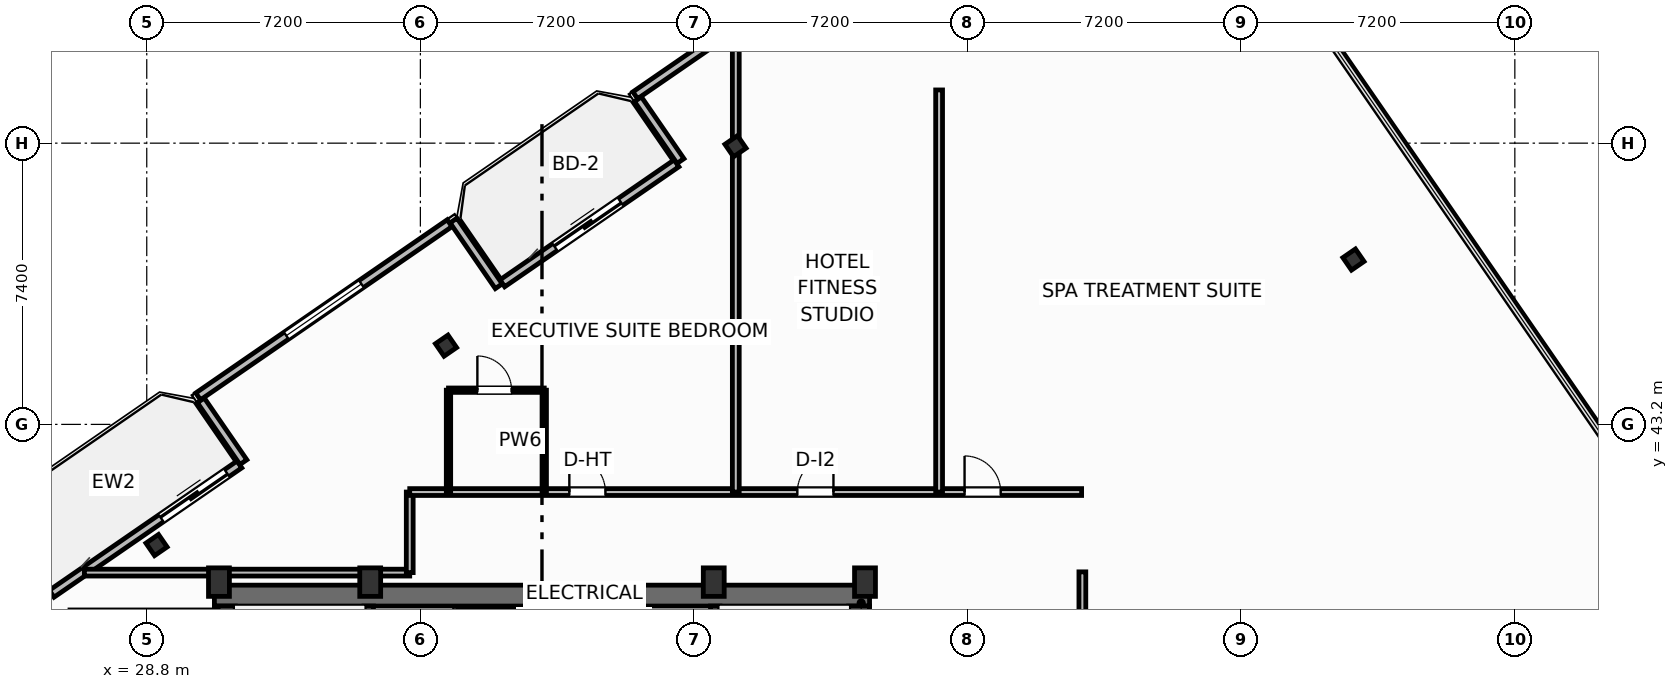
"""IFC4 building model, lengths in metres.
Left out: names, types, materials, properties, quantities, classifications, styles, units other than length and angle.
Written with IfcOpenShell. Run it as: python <this file> out.ifc"""

import sys

from ifc_helpers import new_model, si_unit, direction, frame, frame_2d, origin, origin_2d, place, context, subcontext, project, spatial, rectangle, i_section, extrude, element, fill, save


model = new_model("IFC4")
c1 = context("Model", 3, precision=1e-05, world=origin(), true_north=direction((0.0, 1.0)))
c2 = subcontext(c1, "Body", "Model", "MODEL_VIEW")
j1 = project(units=[si_unit("LENGTHUNIT", "METRE"), si_unit("PLANEANGLEUNIT", "RADIAN")], contexts=[c1])
p1 = place(None, origin())
s1 = spatial("IfcSite", under=j1, at=p1, CompositionType="ELEMENT")
p2 = place(p1, origin())
s2 = spatial("IfcBuilding", under=s1, at=p2, CompositionType="ELEMENT")
p3 = place(p2, frame((0.0, 0.0, 287.8)))
s3 = spatial("IfcBuildingStorey", under=s2, at=p3, CompositionType="ELEMENT", Elevation=287.8)
for number, where, z_axis, x_axis in (
    (1, (30.7, 39.05, 0.0), (0.0, 0.0, 1.0), (1.0, 0.0, 0.0)),
    (2, (34.68, 39.05, 0.0), (0.0, 0.0, 1.0), (1.0, 0.0, 0.0)),
    (3, (43.72, 39.05, 0.0), (0.0, 0.0, 1.0), (1.0, 0.0, 0.0)),
    (4, (47.7, 39.05, 0.0), (0.0, 0.0, 1.0), (1.0, 0.0, 0.0)),
):
    element("IfcColumn", number, at=place(p3, frame(where, z_axis=z_axis, x_axis=x_axis)), inside=s3, PredefinedType="COLUMN", context=c2, shape_type="SweptSolid", body=[
        extrude(rectangle(XDim=0.55, YDim=0.75, at=origin_2d()), origin(), (0.0, 0.0, 1.0), 3.7),
    ])
p4 = place(p3, frame((30.58, 38.695, 0.0), z_axis=(0.0, 0.0, 1.0), x_axis=(1.0, 0.0, 0.0)))
e5 = element("IfcWall", 5, at=p4, inside=s3, PredefinedType="SHEAR", context=c2, shape_type="SweptSolid", body=[
    extrude(rectangle(XDim=17.24, YDim=0.55, at=frame_2d((8.62, 0.0))), origin(), (0.0, 0.0, 1.0), 3.38),
])
for number, where, z_axis, x_axis in (
    (6, (30.855, 29.2, 0.0), (0.0, 0.0, 1.0), (0.0, 1.0, 0.0)),
    (7, (47.545, 29.2, 0.0), (0.0, 0.0, 1.0), (0.0, 1.0, 0.0)),
):
    element("IfcWall", number, at=place(p3, frame(where, z_axis=z_axis, x_axis=x_axis)), inside=s3, PredefinedType="SHEAR", context=c2, shape_type="SweptSolid", body=[
        extrude(rectangle(XDim=9.22, YDim=0.55, at=frame_2d((4.61, 0.0))), origin(), (0.0, 0.0, 1.0), 3.38),
    ])
p5 = place(p3, frame((34.64, 29.2, 0.0), z_axis=(0.0, 0.0, 1.0), x_axis=(0.0, 1.0, 0.0)))
e8 = element("IfcWall", 8, at=p5, inside=s3, PredefinedType="SHEAR", context=c2, shape_type="SweptSolid", body=[
    extrude(rectangle(XDim=9.22, YDim=0.25, at=frame_2d((4.61, 0.0))), origin(), (0.0, 0.0, 1.0), 3.38),
])
p6 = place(p5, frame((0.65, 0.0, 0.0)))
e9 = element("IfcOpeningElement", 9, at=p6, cuts=e8, PredefinedType="OPENING", context=c2, shape_type="SweptSolid", body=[
    extrude(rectangle(XDim=1.05, YDim=2.15, at=frame_2d((0.525, 1.075))), frame((0.0, 0.135, 0.0), z_axis=(0.0, -1.0, 0.0), x_axis=(1.0, 0.0, 0.0)), (0.0, 0.0, 1.0), 0.27),
])
p7 = place(p3, frame((43.76, 29.2, 0.0), z_axis=(0.0, 0.0, 1.0), x_axis=(0.0, 1.0, 0.0)))
e10 = element("IfcWall", 10, at=p7, inside=s3, PredefinedType="SHEAR", context=c2, shape_type="SweptSolid", body=[
    extrude(rectangle(XDim=9.22, YDim=0.25, at=frame_2d((4.61, 0.0))), origin(), (0.0, 0.0, 1.0), 3.38),
])
p8 = place(p7, frame((0.65, 0.0, 0.0)))
e11 = element("IfcOpeningElement", 11, at=p8, cuts=e10, PredefinedType="OPENING", context=c2, shape_type="SweptSolid", body=[
    extrude(rectangle(XDim=1.05, YDim=2.15, at=frame_2d((0.525, 1.075))), frame((0.0, 0.135, 0.0), z_axis=(0.0, -1.0, 0.0), x_axis=(1.0, 0.0, 0.0)), (0.0, 0.0, 1.0), 0.27),
])
for number, where, z_axis, x_axis in (
    (12, (60.554, 47.537, 0.0), (0.0, 0.0, 1.0), (0.824, 0.567, 0.0)),
    (13, (44.292, 50.519, 0.0), (0.0, 0.0, 1.0), (0.824, 0.567, 0.0)),
    (14, (36.675, 45.272, 0.0), (0.0, 0.0, 1.0), (0.824, 0.567, 0.0)),
    (15, (29.057, 40.025, 0.0), (0.0, 0.0, 1.0), (0.824, 0.567, 0.0)),
):
    element("IfcColumn", number, at=place(p3, frame(where, z_axis=z_axis, x_axis=x_axis)), inside=s3, PredefinedType="COLUMN", context=c2, shape_type="SweptSolid", body=[
        extrude(i_section(OverallWidth=0.401, OverallDepth=0.399, WebThickness=0.025, FlangeThickness=0.04, FilletRadius=0.022, at=origin_2d()), origin(), (0.0, 0.0, 1.0), 3.7),
    ])
p9 = place(p3, frame((26.297, 38.743, 0.0), z_axis=(0.0, 0.0, 1.0), x_axis=(0.823534636215, 0.567265989598, 0.0)))
e16 = element("IfcWall", 16, at=p9, inside=s3, PredefinedType="SOLIDWALL", context=c2, shape_type="SweptSolid", body=[
    extrude(rectangle(XDim=6.0, YDim=0.22, at=frame_2d((3.0, 0.0))), origin(), (0.0, 0.0, 1.0), 2.66),
])
p10 = place(p9, frame((3.5, 0.0, 0.0)))
e17 = element("IfcOpeningElement", 17, at=p10, cuts=e16, PredefinedType="OPENING", context=c2, shape_type="SweptSolid", body=[
    extrude(rectangle(XDim=2.1, YDim=2.3, at=frame_2d((1.05, 1.15))), frame((0.0, 0.12, 0.0), z_axis=(0.0, -1.0, 0.0), x_axis=(1.0, 0.0, 0.0)), (0.0, 0.0, 1.0), 0.24),
])
p11 = place(p3, frame((38.156, 46.912, 0.0), z_axis=(0.0, 0.0, 1.0), x_axis=(0.823527178548, 0.567276816195, 0.0)))
e18 = element("IfcWall", 18, at=p11, inside=s3, PredefinedType="SOLIDWALL", context=c2, shape_type="SweptSolid", body=[
    extrude(rectangle(XDim=5.567, YDim=0.22, at=frame_2d((2.783, 0.0))), origin(), (0.0, 0.0, 1.0), 2.66),
])
p12 = place(p11, frame((1.68, 0.0, 0.0)))
e19 = element("IfcOpeningElement", 19, at=p12, cuts=e18, PredefinedType="OPENING", context=c2, shape_type="SweptSolid", body=[
    extrude(rectangle(XDim=2.1, YDim=2.3, at=frame_2d((1.05, 1.15))), frame((0.0, 0.12, 0.0), z_axis=(0.0, -1.0, 0.0), x_axis=(1.0, 0.0, 0.0)), (0.0, 0.0, 1.0), 0.24),
])
p13 = place(p3, frame((50.697, 58.087, 0.0), z_axis=(0.0, 0.0, 1.0), x_axis=(-0.823539455464, -0.567258993137, 0.0)))
e20 = element("IfcWall", 20, at=p13, inside=s3, PredefinedType="SOLIDWALL", context=c2, shape_type="SweptSolid", body=[
    extrude(rectangle(XDim=10.98, YDim=0.22, at=frame_2d((5.49, 0.0))), origin(), (0.0, 0.0, 1.0), 2.66),
])
p14 = place(p13, frame((4.29, 0.0, 0.8)))
e21 = element("IfcOpeningElement", 21, at=p14, cuts=e20, PredefinedType="OPENING", context=c2, shape_type="SweptSolid", body=[
    extrude(rectangle(XDim=2.4, YDim=1.78, at=frame_2d((1.2, 0.89))), frame((0.0, 0.12, 0.0), z_axis=(0.0, -1.0, 0.0), x_axis=(1.0, 0.0, 0.0)), (0.0, 0.0, 1.0), 0.24),
])
p15 = place(p3, frame((41.725, 51.756, 0.0), z_axis=(0.0, 0.0, 1.0), x_axis=(0.567273565974, -0.823529417415, 0.0)))
e22 = element("IfcWall", 22, at=p15, inside=s3, PredefinedType="SOLIDWALL", context=c2, shape_type="SweptSolid", body=[
    extrude(rectangle(XDim=1.975, YDim=0.22, at=frame_2d((0.988, 0.0))), origin(), (0.0, 0.0, 1.0), 2.66),
])
p16 = place(p3, frame((38.063, 46.835, 0.0), z_axis=(0.0, 0.0, 1.0), x_axis=(-0.567219383419, 0.823566737474, 0.0)))
e23 = element("IfcWall", 23, at=p16, inside=s3, PredefinedType="SOLIDWALL", context=c2, shape_type="SweptSolid", body=[
    extrude(rectangle(XDim=2.1, YDim=0.22, at=frame_2d((1.05, 0.0))), origin(), (0.0, 0.0, 1.0), 2.66),
])
p17 = place(p3, frame((36.769, 48.494, 0.0), z_axis=(0.0, 0.0, 1.0), x_axis=(-0.823521165086, -0.56728554596, 0.0)))
e24 = element("IfcWall", 24, at=p17, inside=s3, PredefinedType="SOLIDWALL", context=c2, shape_type="SweptSolid", body=[
    extrude(rectangle(XDim=8.035, YDim=0.22, at=frame_2d((4.018, 0.0))), origin(), (0.0, 0.0, 1.0), 2.66),
])
p18 = place(p17, frame((2.817, 0.0, 0.8)))
e25 = element("IfcOpeningElement", 25, at=p18, cuts=e24, PredefinedType="OPENING", context=c2, shape_type="SweptSolid", body=[
    extrude(rectangle(XDim=2.4, YDim=1.78, at=frame_2d((1.2, 0.89))), frame((0.0, 0.12, 0.0), z_axis=(0.0, -1.0, 0.0), x_axis=(1.0, 0.0, 0.0)), (0.0, 0.0, 1.0), 0.24),
])
p19 = place(p3, frame((30.223, 43.833, 0.0), z_axis=(0.0, 0.0, 1.0), x_axis=(0.567215821234, -0.823569190865, 0.0)))
e26 = element("IfcWall", 26, at=p19, inside=s3, PredefinedType="SOLIDWALL", context=c2, shape_type="SweptSolid", body=[
    extrude(rectangle(XDim=1.975, YDim=0.22, at=frame_2d((0.988, 0.0))), origin(), (0.0, 0.0, 1.0), 2.66),
])
p20 = place(p3, frame((53.42, 28.98, 0.0), z_axis=(0.0, 0.0, 1.0), x_axis=(0.0, 1.0, 0.0)))
e27 = element("IfcWall", 27, at=p20, inside=s3, PredefinedType="PARTITIONING", context=c2, shape_type="SweptSolid", body=[
    extrude(rectangle(XDim=10.34, YDim=0.18, at=frame_2d((5.17, 0.0))), origin(), (0.0, 0.0, 1.0), 3.38),
])
p21 = place(p20, frame((2.4, 0.0, 0.0)))
e28 = element("IfcOpeningElement", 28, at=p21, cuts=e27, PredefinedType="OPENING", context=c2, shape_type="SweptSolid", body=[
    extrude(rectangle(XDim=1.0, YDim=2.05, at=frame_2d((0.5, 1.025))), frame((0.0, 0.1, 0.0), z_axis=(0.0, -1.0, 0.0), x_axis=(1.0, 0.0, 0.0)), (0.0, 0.0, 1.0), 0.2),
])
p22 = place(p3, frame((27.159, 39.3, 0.0), z_axis=(0.0, 0.0, 1.0), x_axis=(1.0, 0.0, 0.0)))
e29 = element("IfcWall", 29, at=p22, inside=s3, PredefinedType="PARTITIONING", context=c2, shape_type="SweptSolid", body=[
    extrude(rectangle(XDim=8.561, YDim=0.18, at=frame_2d((4.281, 0.0))), origin(), (0.0, 0.0, 1.0), 3.38),
])
p23 = place(p3, frame((35.72, 39.3, 0.0), z_axis=(0.0, 0.0, 1.0), x_axis=(0.0, 1.0, 0.0)))
e30 = element("IfcWall", 30, at=p23, inside=s3, PredefinedType="PARTITIONING", context=c2, shape_type="SweptSolid", body=[
    extrude(rectangle(XDim=2.12, YDim=0.18, at=frame_2d((1.06, 0.0))), origin(), (0.0, 0.0, 1.0), 3.38),
])
p24 = place(p3, frame((35.72, 41.42, 0.0), z_axis=(0.0, 0.0, 1.0), x_axis=(1.0, 0.0, 0.0)))
e31 = element("IfcWall", 31, at=p24, inside=s3, PredefinedType="PARTITIONING", context=c2, shape_type="SweptSolid", body=[
    extrude(rectangle(XDim=17.68, YDim=0.18, at=frame_2d((8.84, 0.0))), origin(), (0.0, 0.0, 1.0), 3.38),
])
p25 = place(p24, frame((4.2, 0.0, 0.0)))
e32 = element("IfcOpeningElement", 32, at=p25, cuts=e31, PredefinedType="OPENING", context=c2, shape_type="SweptSolid", body=[
    extrude(rectangle(XDim=0.95, YDim=2.15, at=frame_2d((0.475, 1.075))), frame((0.0, 0.1, 0.0), z_axis=(0.0, -1.0, 0.0), x_axis=(1.0, 0.0, 0.0)), (0.0, 0.0, 1.0), 0.2),
])
p26 = place(p24, frame((10.2, 0.0, 0.0)))
e33 = element("IfcOpeningElement", 33, at=p26, cuts=e31, PredefinedType="OPENING", context=c2, shape_type="SweptSolid", body=[
    extrude(rectangle(XDim=0.95, YDim=2.05, at=frame_2d((0.475, 1.025))), frame((0.0, 0.1, 0.0), z_axis=(0.0, -1.0, 0.0), x_axis=(1.0, 0.0, 0.0)), (0.0, 0.0, 1.0), 0.2),
])
p27 = place(p24, frame((14.6, 0.0, 0.0)))
e34 = element("IfcOpeningElement", 34, at=p27, cuts=e31, PredefinedType="OPENING", context=c2, shape_type="SweptSolid", body=[
    extrude(rectangle(XDim=0.95, YDim=2.05, at=frame_2d((0.475, 1.025))), frame((0.0, 0.1, 0.0), z_axis=(0.0, -1.0, 0.0), x_axis=(1.0, 0.0, 0.0)), (0.0, 0.0, 1.0), 0.2),
])
for number, where, z_axis, x_axis in (
    (35, (36.74, 41.42, 0.0), (0.0, 0.0, 1.0), (0.0, 1.0, 0.0)),
    (36, (39.26, 41.42, 0.0), (0.0, 0.0, 1.0), (0.0, 1.0, 0.0)),
):
    element("IfcWall", number, at=place(p3, frame(where, z_axis=z_axis, x_axis=x_axis)), inside=s3, PredefinedType="PARTITIONING", context=c2, shape_type="SweptSolid", body=[
        extrude(rectangle(XDim=2.68, YDim=0.115, at=frame_2d((1.34, 0.0))), origin(), (0.0, 0.0, 1.0), 3.38),
    ])
p28 = place(p3, frame((36.74, 44.1, 0.0), z_axis=(0.0, 0.0, 1.0), x_axis=(1.0, 0.0, 0.0)))
e37 = element("IfcWall", 37, at=p28, inside=s3, PredefinedType="PARTITIONING", context=c2, shape_type="SweptSolid", body=[
    extrude(rectangle(XDim=2.52, YDim=0.115, at=frame_2d((1.26, 0.0))), origin(), (0.0, 0.0, 1.0), 3.38),
])
p29 = place(p28, frame((0.76, 0.0, 0.0)))
e38 = element("IfcOpeningElement", 38, at=p29, cuts=e37, PredefinedType="OPENING", context=c2, shape_type="SweptSolid", body=[
    extrude(rectangle(XDim=0.9, YDim=2.05, at=frame_2d((0.45, 1.025))), frame((0.0, 0.067, 0.0), z_axis=(0.0, -1.0, 0.0), x_axis=(1.0, 0.0, 0.0)), (0.0, 0.0, 1.0), 0.135),
])
p30 = place(p3, frame((44.3, 41.42, 0.0), z_axis=(0.0, 0.0, 1.0), x_axis=(0.0, 1.0, 0.0)))
e39 = element("IfcWall", 39, at=p30, inside=s3, PredefinedType="PARTITIONING", context=c2, shape_type="SweptSolid", body=[
    extrude(rectangle(XDim=12.221, YDim=0.18, at=frame_2d((6.111, 0.0))), origin(), (0.0, 0.0, 1.0), 2.669),
])
p31 = place(p3, frame((49.65, 41.42, 0.0), z_axis=(0.0, 0.0, 1.0), x_axis=(0.0, 1.0, 0.0)))
e40 = element("IfcWall", 40, at=p31, inside=s3, PredefinedType="PARTITIONING", context=c2, shape_type="SweptSolid", body=[
    extrude(rectangle(XDim=10.58, YDim=0.18, at=frame_2d((5.29, 0.0))), origin(), (0.0, 0.0, 1.0), 3.38),
])
p32 = place(p10, origin())
e41 = element("IfcDoor", 41, at=p32, inside=s3, OperationType="SLIDING_TO_LEFT", PredefinedType="DOOR", context=c2, shape_type="SweptSolid", body=[
    extrude(rectangle(XDim=2.1, YDim=2.3, at=frame_2d((1.05, 1.15))), frame((0.0, 0.025, 0.0), z_axis=(0.0, -1.0, 0.0), x_axis=(1.0, 0.0, 0.0)), (0.0, 0.0, 1.0), 0.05),
])
fill(e17, e41)
p33 = place(p12, origin())
e42 = element("IfcDoor", 42, at=p33, inside=s3, OperationType="SLIDING_TO_LEFT", PredefinedType="DOOR", context=c2, shape_type="SweptSolid", body=[
    extrude(rectangle(XDim=2.1, YDim=2.3, at=frame_2d((1.05, 1.15))), frame((0.0, 0.025, 0.0), z_axis=(0.0, -1.0, 0.0), x_axis=(1.0, 0.0, 0.0)), (0.0, 0.0, 1.0), 0.05),
])
fill(e19, e42)
p34 = place(p18, origin())
e43 = element("IfcWindow", 43, at=p34, inside=s3, PartitioningType="SINGLE_PANEL", PredefinedType="WINDOW", context=c2, shape_type="SweptSolid", body=[
    extrude(rectangle(XDim=2.4, YDim=1.78, at=frame_2d((1.2, 0.89))), frame((0.0, 0.03, 0.0), z_axis=(0.0, -1.0, 0.0), x_axis=(1.0, 0.0, 0.0)), (0.0, 0.0, 1.0), 0.06),
])
fill(e25, e43)
p35 = place(p25, origin())
e44 = element("IfcDoor", 44, at=p35, inside=s3, OperationType="SINGLE_SWING_LEFT", PredefinedType="DOOR", context=c2, shape_type="SweptSolid", body=[
    extrude(rectangle(XDim=0.95, YDim=2.15, at=frame_2d((0.475, 1.075))), frame((0.0, 0.025, 0.0), z_axis=(0.0, -1.0, 0.0), x_axis=(1.0, 0.0, 0.0)), (0.0, 0.0, 1.0), 0.05),
])
fill(e32, e44)
p36 = place(p26, origin())
e45 = element("IfcDoor", 45, at=p36, inside=s3, OperationType="SINGLE_SWING_RIGHT", PredefinedType="DOOR", context=c2, shape_type="SweptSolid", body=[
    extrude(rectangle(XDim=0.95, YDim=2.05, at=frame_2d((0.475, 1.025))), frame((0.0, 0.025, 0.0), z_axis=(0.0, -1.0, 0.0), x_axis=(1.0, 0.0, 0.0)), (0.0, 0.0, 1.0), 0.05),
])
fill(e33, e45)
p37 = place(p27, origin())
e46 = element("IfcDoor", 46, at=p37, inside=s3, OperationType="SINGLE_SWING_LEFT", PredefinedType="DOOR", context=c2, shape_type="SweptSolid", body=[
    extrude(rectangle(XDim=0.95, YDim=2.05, at=frame_2d((0.475, 1.025))), frame((0.0, 0.025, 0.0), z_axis=(0.0, -1.0, 0.0), x_axis=(1.0, 0.0, 0.0)), (0.0, 0.0, 1.0), 0.05),
])
fill(e34, e46)
p38 = place(p29, origin())
e47 = element("IfcDoor", 47, at=p38, inside=s3, OperationType="SINGLE_SWING_LEFT", PredefinedType="DOOR", context=c2, shape_type="SweptSolid", body=[
    extrude(rectangle(XDim=0.9, YDim=2.05, at=frame_2d((0.45, 1.025))), frame((0.0, 0.025, 0.0), z_axis=(0.0, -1.0, 0.0), x_axis=(1.0, 0.0, 0.0)), (0.0, 0.0, 1.0), 0.05),
])
fill(e38, e47)
save(model, sys.argv[1])
